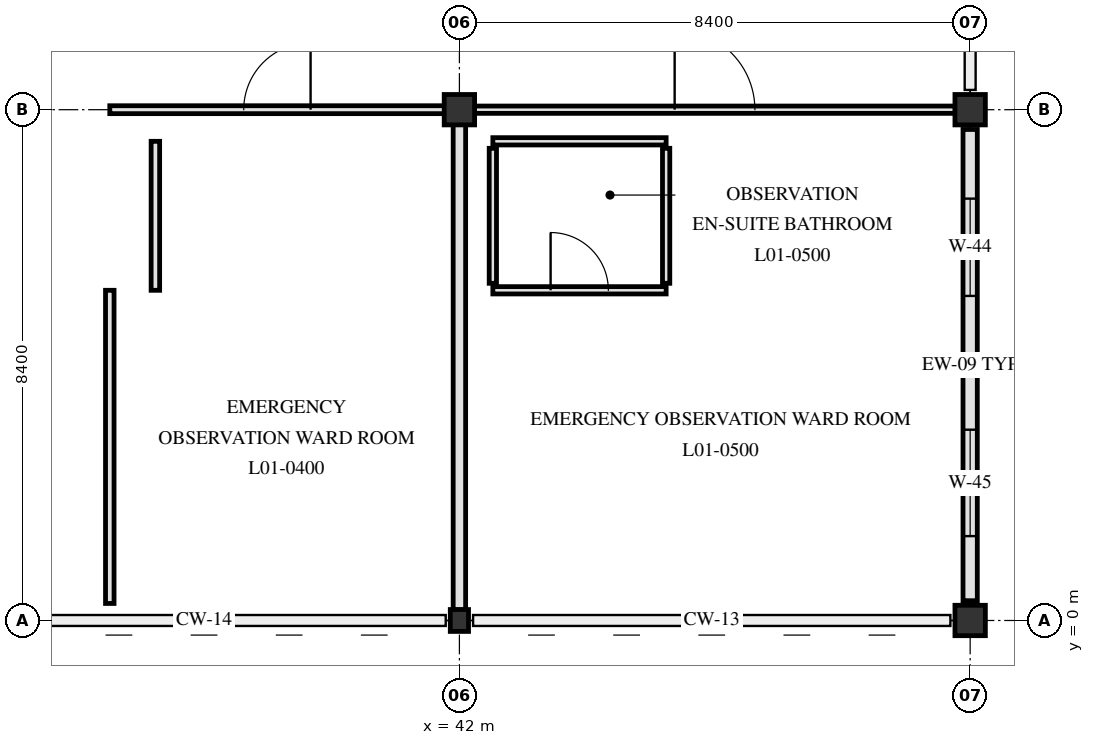
"""IFC4 building model, lengths in metres.
Left out: names, types, materials, properties, quantities, classifications, styles, units other than length and angle.
Written with IfcOpenShell. Run it as: python <this file> out.ifc"""

import sys

from ifc_helpers import new_model, si_unit, direction, frame, frame_2d, origin, origin_2d, place, context, subcontext, project, spatial, rectangle, i_section, extrude, element, fill, save


model = new_model("IFC4")
c1 = context("Model", 3, precision=1e-05, world=origin(), true_north=direction((0.0, 1.0)))
c2 = subcontext(c1, "Body", "Model", "MODEL_VIEW")
j1 = project(units=[si_unit("LENGTHUNIT", "METRE"), si_unit("PLANEANGLEUNIT", "RADIAN")], contexts=[c1])
p1 = place(None, origin())
s1 = spatial("IfcSite", under=j1, at=p1, CompositionType="ELEMENT")
p2 = place(p1, origin())
s2 = spatial("IfcBuilding", under=s1, at=p2, CompositionType="ELEMENT")
p3 = place(p2, frame((0.0, 0.0, 4.8)))
s3 = spatial("IfcBuildingStorey", under=s2, at=p3, CompositionType="ELEMENT", Elevation=4.8)
p4 = place(p3, frame((42.0, 0.0, 0.0), z_axis=(0.0, 0.0, 1.0), x_axis=(1.0, 0.0, 0.0)))
e1 = element("IfcColumn", 1, at=p4, inside=s3, PredefinedType="COLUMN", context=c2, shape_type="SweptSolid", body=[
    extrude(i_section(OverallWidth=0.3, OverallDepth=0.36, WebThickness=0.012, FlangeThickness=0.022, FilletRadius=0.027, at=origin_2d()), origin(), (0.0, 0.0, 1.0), 4.5),
])
for number, where, z_axis, x_axis in (
    (2, (42.0, 8.4, 0.0), (0.0, 0.0, 1.0), (1.0, 0.0, 0.0)),
    (3, (50.4, 0.0, 0.0), (0.0, 0.0, 1.0), (1.0, 0.0, 0.0)),
    (4, (50.4, 8.4, 0.0), (0.0, 0.0, 1.0), (1.0, 0.0, 0.0)),
):
    element("IfcColumn", number, at=place(p3, frame(where, z_axis=z_axis, x_axis=x_axis)), inside=s3, PredefinedType="COLUMN", context=c2, shape_type="SweptSolid", body=[
        extrude(rectangle(XDim=0.5, YDim=0.5, at=origin_2d()), origin(), (0.0, 0.0, 1.0), 4.5),
    ])
p5 = place(p3, frame((50.4, 8.075, 0.0), z_axis=(0.0, 0.0, 1.0), x_axis=(0.0, -1.0, 0.0)))
e5 = element("IfcWall", 5, at=p5, inside=s3, PredefinedType="SOLIDWALL", context=c2, shape_type="SweptSolid", body=[
    extrude(rectangle(XDim=7.75, YDim=0.235, at=frame_2d((3.875, 0.0))), origin(), (0.0, 0.0, 1.0), 3.44),
])
p6 = place(p5, frame((1.137, 0.0, 0.85)))
e6 = element("IfcOpeningElement", 6, at=p6, cuts=e5, PredefinedType="OPENING", context=c2, shape_type="SweptSolid", body=[
    extrude(rectangle(XDim=1.6, YDim=1.78, at=frame_2d((0.8, 0.89))), frame((0.0, 0.127, 0.0), z_axis=(0.0, -1.0, 0.0), x_axis=(1.0, 0.0, 0.0)), (0.0, 0.0, 1.0), 0.255),
])
p7 = place(p5, frame((4.938, 0.0, 0.85)))
e7 = element("IfcOpeningElement", 7, at=p7, cuts=e5, PredefinedType="OPENING", context=c2, shape_type="SweptSolid", body=[
    extrude(rectangle(XDim=1.75, YDim=1.78, at=frame_2d((0.875, 0.89))), frame((0.0, 0.127, 0.0), z_axis=(0.0, -1.0, 0.0), x_axis=(1.0, 0.0, 0.0)), (0.0, 0.0, 1.0), 0.255),
])
p8 = place(p3, frame((42.55, 5.43, 0.0), z_axis=(0.0, 0.0, 1.0), x_axis=(1.0, 0.0, 0.0)))
e8 = element("IfcWall", 8, at=p8, inside=s3, PredefinedType="PARTITIONING", context=c2, shape_type="SweptSolid", body=[
    extrude(rectangle(XDim=2.85, YDim=0.12, at=frame_2d((1.425, 0.0))), origin(), (0.0, 0.0, 1.0), 4.14),
])
p9 = place(p8, frame((0.95, 0.0, 0.0)))
e9 = element("IfcOpeningElement", 9, at=p9, cuts=e8, PredefinedType="OPENING", context=c2, shape_type="SweptSolid", body=[
    extrude(rectangle(XDim=0.95, YDim=2.1, at=frame_2d((0.475, 1.05))), frame((0.0, 0.07, 0.0), z_axis=(0.0, -1.0, 0.0), x_axis=(1.0, 0.0, 0.0)), (0.0, 0.0, 1.0), 0.14),
])
p10 = place(p3, frame((42.55, 7.88, 0.0), z_axis=(0.0, 0.0, 1.0), x_axis=(1.0, 0.0, 0.0)))
e10 = element("IfcWall", 10, at=p10, inside=s3, PredefinedType="PARTITIONING", context=c2, shape_type="SweptSolid", body=[
    extrude(rectangle(XDim=2.85, YDim=0.12, at=frame_2d((1.425, 0.0))), origin(), (0.0, 0.0, 1.0), 4.14),
])
p11 = place(p3, frame((36.25, 8.4, 0.0), z_axis=(0.0, 0.0, 1.0), x_axis=(1.0, 0.0, 0.0)))
e11 = element("IfcWall", 11, at=p11, inside=s3, PredefinedType="PARTITIONING", context=c2, shape_type="SweptSolid", body=[
    extrude(rectangle(XDim=5.505, YDim=0.13, at=frame_2d((2.752, 0.0))), origin(), (0.0, 0.0, 1.0), 3.54),
])
p12 = place(p11, frame((2.202, 0.0, 0.0)))
e12 = element("IfcOpeningElement", 12, at=p12, cuts=e11, PredefinedType="OPENING", context=c2, shape_type="SweptSolid", body=[
    extrude(rectangle(XDim=1.1, YDim=2.15, at=frame_2d((0.55, 1.075))), frame((0.0, 0.075, 0.0), z_axis=(0.0, -1.0, 0.0), x_axis=(1.0, 0.0, 0.0)), (0.0, 0.0, 1.0), 0.15),
])
p13 = place(p3, frame((42.245, 8.4, 0.0), z_axis=(0.0, 0.0, 1.0), x_axis=(1.0, 0.0, 0.0)))
e13 = element("IfcWall", 13, at=p13, inside=s3, PredefinedType="PARTITIONING", context=c2, shape_type="SweptSolid", body=[
    extrude(rectangle(XDim=7.91, YDim=0.12, at=frame_2d((3.955, 0.0))), origin(), (0.0, 0.0, 1.0), 3.54),
])
p14 = place(p13, frame((3.295, 0.0, 0.0)))
e14 = element("IfcOpeningElement", 14, at=p14, cuts=e13, PredefinedType="OPENING", context=c2, shape_type="SweptSolid", body=[
    extrude(rectangle(XDim=1.32, YDim=2.18, at=frame_2d((0.66, 1.09))), frame((0.0, 0.07, 0.0), z_axis=(0.0, -1.0, 0.0), x_axis=(1.0, 0.0, 0.0)), (0.0, 0.0, 1.0), 0.14),
])
p15 = place(p3, frame((36.25, 0.28, 0.0), z_axis=(0.0, 0.0, 1.0), x_axis=(0.0, 1.0, 0.0)))
e15 = element("IfcWall", 15, at=p15, inside=s3, PredefinedType="PARTITIONING", context=c2, shape_type="SweptSolid", body=[
    extrude(rectangle(XDim=5.15, YDim=0.14, at=frame_2d((2.575, 0.0))), origin(), (0.0, 0.0, 1.0), 4.14),
])
p16 = place(p3, frame((37.0, 5.43, 0.0), z_axis=(0.0, 0.0, 1.0), x_axis=(0.0, 1.0, 0.0)))
e16 = element("IfcWall", 16, at=p16, inside=s3, PredefinedType="PARTITIONING", context=c2, shape_type="SweptSolid", body=[
    extrude(rectangle(XDim=2.45, YDim=0.14, at=frame_2d((1.225, 0.0))), origin(), (0.0, 0.0, 1.0), 4.14),
])
p17 = place(p3, frame((42.0, 0.175, 0.0), z_axis=(0.0, 0.0, 1.0), x_axis=(0.0, 1.0, 0.0)))
e17 = element("IfcWall", 17, at=p17, inside=s3, PredefinedType="PARTITIONING", context=c2, shape_type="SweptSolid", body=[
    extrude(rectangle(XDim=7.98, YDim=0.205, at=frame_2d((3.99, 0.0))), origin(), (0.0, 0.0, 1.0), 3.59),
])
for number, where, z_axis, x_axis in (
    (18, (42.55, 5.545, 0.0), (0.0, 0.0, 1.0), (0.0, 1.0, 0.0)),
    (19, (45.4, 5.545, 0.0), (0.0, 0.0, 1.0), (0.0, 1.0, 0.0)),
):
    element("IfcWall", number, at=place(p3, frame(where, z_axis=z_axis, x_axis=x_axis)), inside=s3, PredefinedType="PARTITIONING", context=c2, shape_type="SweptSolid", body=[
        extrude(rectangle(XDim=2.22, YDim=0.12, at=frame_2d((1.11, 0.0))), origin(), (0.0, 0.0, 1.0), 4.14),
    ])
p18 = place(p6, origin())
e20 = element("IfcWindow", 20, at=p18, inside=s3, PartitioningType="SINGLE_PANEL", PredefinedType="WINDOW", context=c2, shape_type="SweptSolid", body=[
    extrude(rectangle(XDim=1.6, YDim=1.78, at=frame_2d((0.8, 0.89))), frame((0.0, 0.03, 0.0), z_axis=(0.0, -1.0, 0.0), x_axis=(1.0, 0.0, 0.0)), (0.0, 0.0, 1.0), 0.06),
])
fill(e6, e20)
p19 = place(p7, origin())
e21 = element("IfcWindow", 21, at=p19, inside=s3, PartitioningType="SINGLE_PANEL", PredefinedType="WINDOW", context=c2, shape_type="SweptSolid", body=[
    extrude(rectangle(XDim=1.75, YDim=1.78, at=frame_2d((0.875, 0.89))), frame((0.0, 0.03, 0.0), z_axis=(0.0, -1.0, 0.0), x_axis=(1.0, 0.0, 0.0)), (0.0, 0.0, 1.0), 0.06),
])
fill(e7, e21)
p20 = place(p12, origin())
e22 = element("IfcDoor", 22, at=p20, inside=s3, OperationType="SINGLE_SWING_RIGHT", PredefinedType="DOOR", context=c2, shape_type="SweptSolid", body=[
    extrude(rectangle(XDim=1.1, YDim=2.15, at=frame_2d((0.55, 1.075))), frame((0.0, 0.025, 0.0), z_axis=(0.0, -1.0, 0.0), x_axis=(1.0, 0.0, 0.0)), (0.0, 0.0, 1.0), 0.05),
])
fill(e12, e22)
p21 = place(p14, origin())
e23 = element("IfcDoor", 23, at=p21, inside=s3, OperationType="SINGLE_SWING_LEFT", PredefinedType="DOOR", context=c2, shape_type="SweptSolid", body=[
    extrude(rectangle(XDim=1.32, YDim=2.18, at=frame_2d((0.66, 1.09))), frame((0.0, 0.025, 0.0), z_axis=(0.0, -1.0, 0.0), x_axis=(1.0, 0.0, 0.0)), (0.0, 0.0, 1.0), 0.05),
])
fill(e14, e23)
p22 = place(p9, origin())
e24 = element("IfcDoor", 24, at=p22, inside=s3, OperationType="SINGLE_SWING_LEFT", PredefinedType="DOOR", context=c2, shape_type="SweptSolid", body=[
    extrude(rectangle(XDim=0.95, YDim=2.1, at=frame_2d((0.475, 1.05))), frame((0.0, 0.025, 0.0), z_axis=(0.0, -1.0, 0.0), x_axis=(1.0, 0.0, 0.0)), (0.0, 0.0, 1.0), 0.05),
])
fill(e9, e24)
save(model, sys.argv[1])
